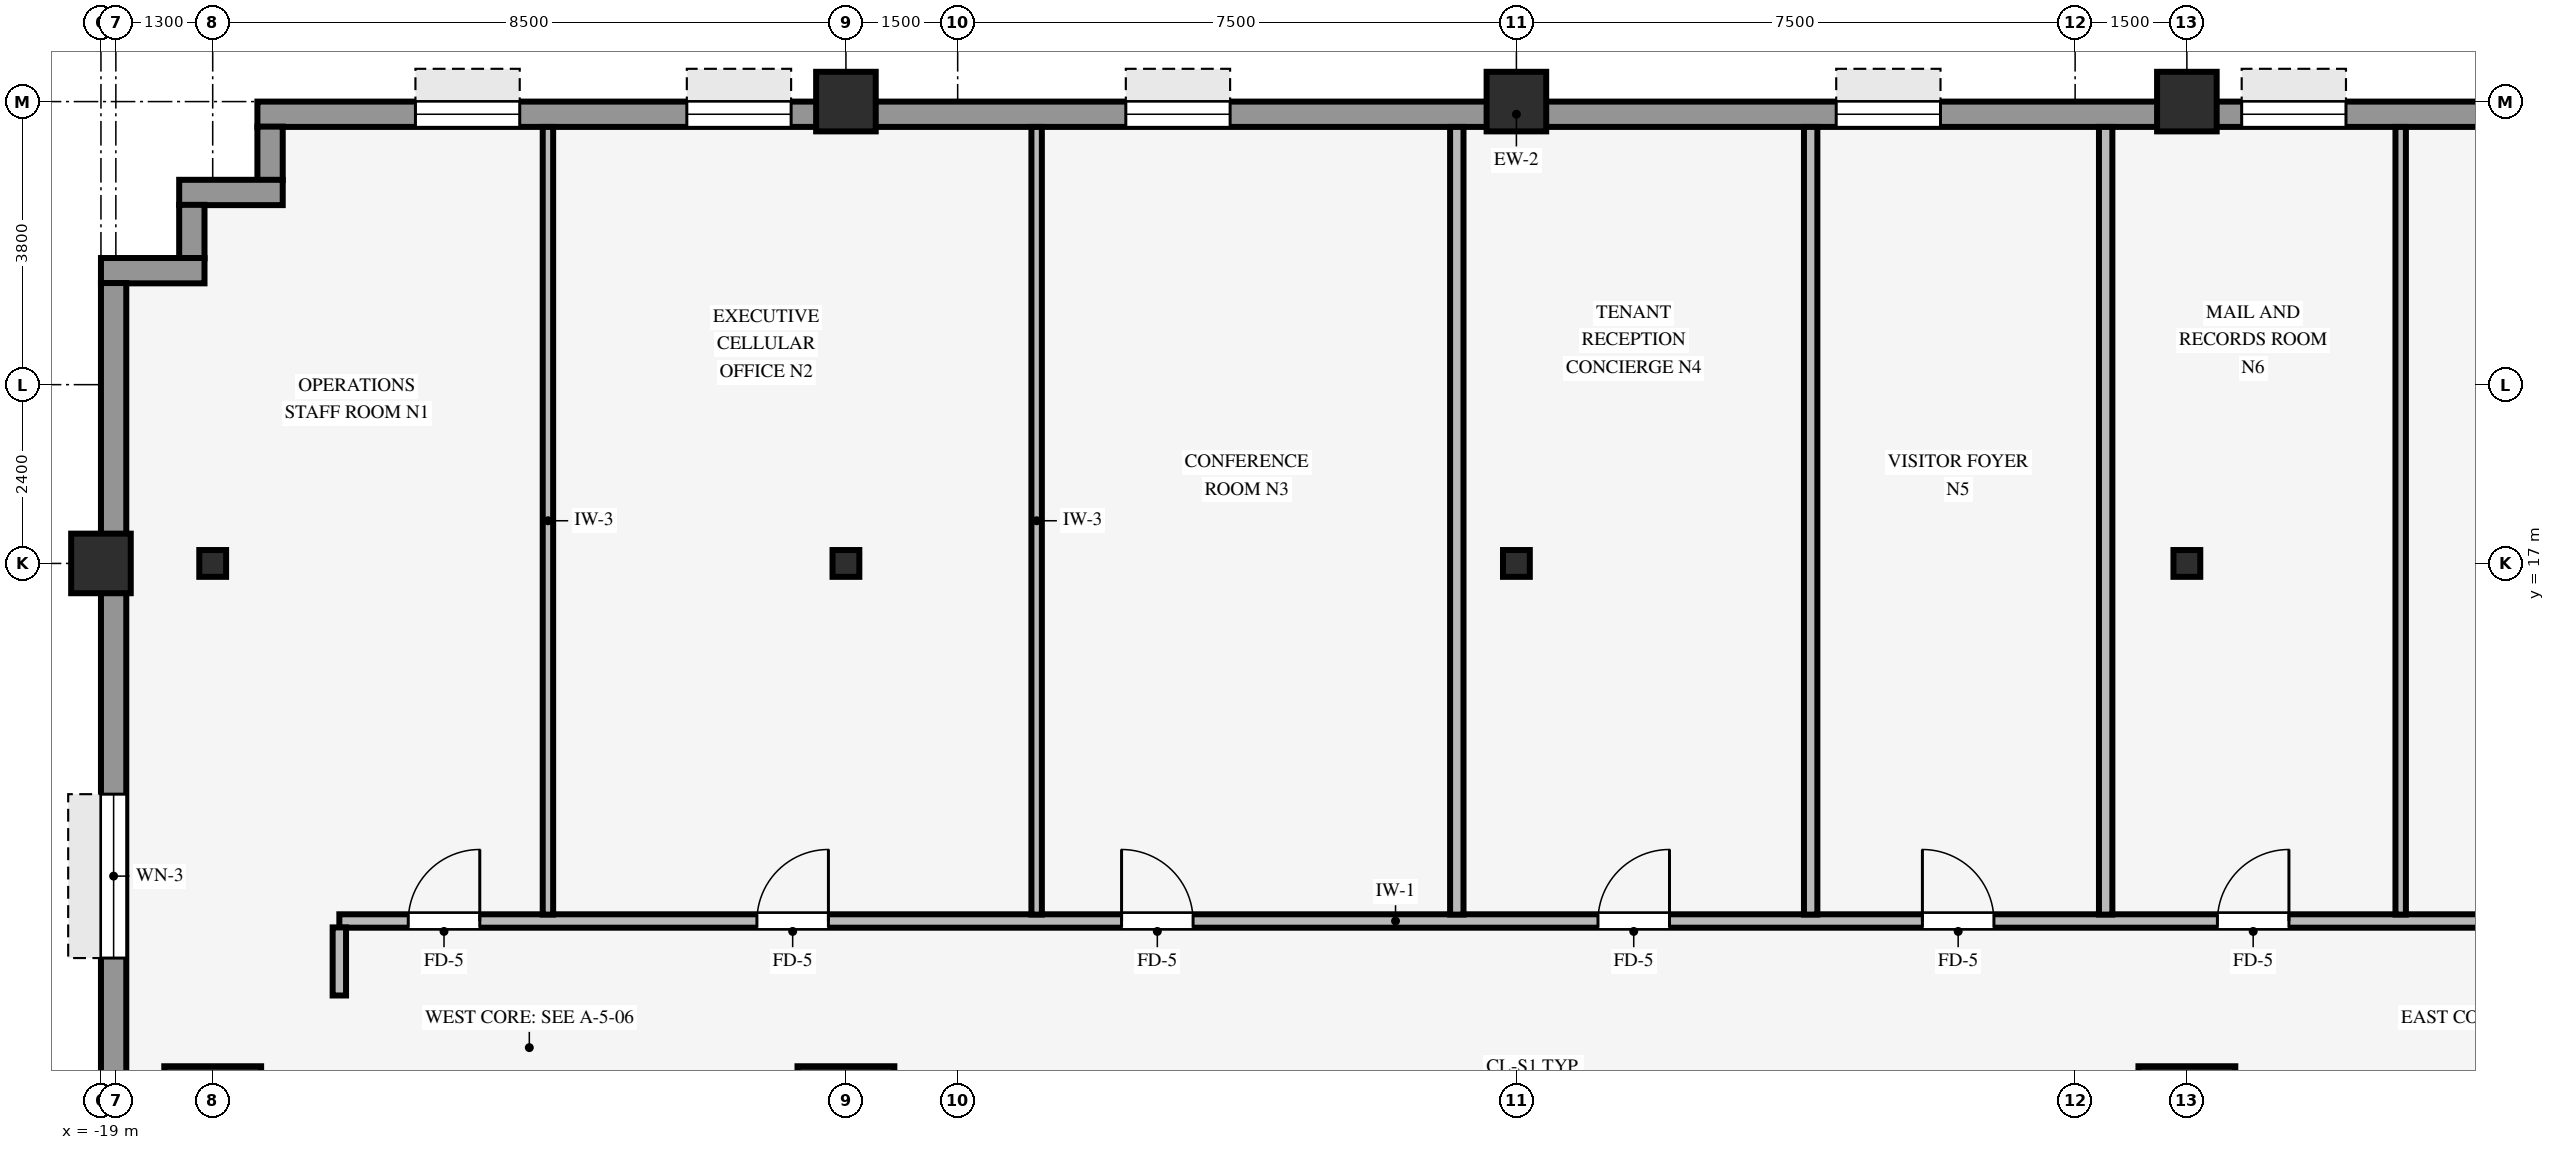
"""IFC4 building model, lengths in metres.
Left out: names, types, materials, properties, quantities, classifications, styles, units other than length and angle.
Written with IfcOpenShell. Run it as: python <this file> out.ifc"""

import sys

from ifc_helpers import new_model, si_unit, direction, frame, frame_2d, origin, origin_2d, place, context, subcontext, project, spatial, rectangle, hollow_rectangle, i_section, extrude, source, transform, mapped, element, fill, save


model = new_model("IFC4")
c1 = context("Model", 3, precision=1e-05, world=origin(), true_north=direction((0.0, 1.0)))
c2 = subcontext(c1, "Body", "Model", "MODEL_VIEW")
j1 = project(units=[si_unit("LENGTHUNIT", "METRE"), si_unit("PLANEANGLEUNIT", "RADIAN")], contexts=[c1])
p1 = place(None, origin())
s1 = spatial("IfcSite", under=j1, at=p1, CompositionType="ELEMENT")
p2 = place(p1, origin())
s2 = spatial("IfcBuilding", under=s1, at=p2, CompositionType="ELEMENT")
p3 = place(p2, frame((0.0, 0.0, 49.5)))
s3 = spatial("IfcBuildingStorey", under=s2, at=p3, CompositionType="ELEMENT", Elevation=49.5)
for number, where, z_axis, x_axis in (
    (1, (-17.5, 9.6, 0.0), (0.0, 0.0, 1.0), (1.0, 0.0, 0.0)),
    (2, (-9.0, 9.6, 0.0), (0.0, 0.0, 1.0), (1.0, 0.0, 0.0)),
    (3, (9.0, 9.6, 0.0), (0.0, 0.0, 1.0), (1.0, 0.0, 0.0)),
):
    element("IfcColumn", number, at=place(p3, frame(where, z_axis=z_axis, x_axis=x_axis)), inside=s3, PredefinedType="COLUMN", context=c2, shape_type="SweptSolid", body=[
        extrude(rectangle(XDim=1.3, YDim=1.3, at=origin_2d()), origin(), (0.0, 0.0, 1.0), 3.37),
    ])
for number, where, z_axis, x_axis in (
    (4, (-19.0, 17.0, 0.0), (0.0, 0.0, 1.0), (1.0, 0.0, 0.0)),
    (5, (-9.0, 23.2, 0.0), (0.0, 0.0, 1.0), (1.0, 0.0, 0.0)),
    (6, (0.0, 23.2, 0.0), (0.0, 0.0, 1.0), (1.0, 0.0, 0.0)),
    (7, (9.0, 23.2, 0.0), (0.0, 0.0, 1.0), (1.0, 0.0, 0.0)),
):
    element("IfcColumn", number, at=place(p3, frame(where, z_axis=z_axis, x_axis=x_axis)), inside=s3, PredefinedType="COLUMN", context=c2, shape_type="SweptSolid", body=[
        extrude(hollow_rectangle(XDim=0.8, YDim=0.8, WallThickness=0.055, InnerFilletRadius=0.055, OuterFilletRadius=0.11, at=origin_2d()), origin(), (0.0, 0.0, 1.0), 3.37),
    ])
for number, where, z_axis, x_axis in (
    (8, (0.0, 17.0, 0.0), (0.0, 0.0, 1.0), (1.0, 0.0, 0.0)),
    (9, (-17.5, 17.0, 0.0), (0.0, 0.0, 1.0), (1.0, 0.0, 0.0)),
    (10, (-9.0, 17.0, 0.0), (0.0, 0.0, 1.0), (1.0, 0.0, 0.0)),
    (11, (9.0, 17.0, 0.0), (0.0, 0.0, 1.0), (1.0, 0.0, 0.0)),
):
    element("IfcColumn", number, at=place(p3, frame(where, z_axis=z_axis, x_axis=x_axis)), inside=s3, PredefinedType="COLUMN", context=c2, shape_type="SweptSolid", body=[
        extrude(i_section(OverallWidth=0.36, OverallDepth=0.36, WebThickness=0.021, FlangeThickness=0.021, FilletRadius=0.018, at=origin_2d()), origin(), (0.0, 0.0, 1.0), 3.37),
    ])
p4 = place(p3, frame((-16.9, 23.03, 0.0), z_axis=(0.0, 0.0, 1.0), x_axis=(1.0, 0.0, 0.0)))
e12 = element("IfcWall", 12, at=p4, inside=s3, PredefinedType="STANDARD", context=c2, shape_type="SweptSolid", body=[
    extrude(rectangle(XDim=33.8, YDim=0.34, at=frame_2d((16.9, 0.0))), origin(), (0.0, 0.0, 1.0), 2.705),
])
p5 = place(p4, frame((2.121, 0.0, 0.8)))
e13 = element("IfcOpeningElement", 13, at=p5, cuts=e12, PredefinedType="OPENING", context=c2, shape_type="SweptSolid", body=[
    extrude(rectangle(XDim=1.4, YDim=1.65, at=frame_2d((0.7, 0.825))), frame((0.0, 0.18, 0.0), z_axis=(0.0, -1.0, 0.0), x_axis=(1.0, 0.0, 0.0)), (0.0, 0.0, 1.0), 0.36),
])
p6 = place(p4, frame((5.764, 0.0, 0.8)))
e14 = element("IfcOpeningElement", 14, at=p6, cuts=e12, PredefinedType="OPENING", context=c2, shape_type="SweptSolid", body=[
    extrude(rectangle(XDim=1.4, YDim=1.65, at=frame_2d((0.7, 0.825))), frame((0.0, 0.18, 0.0), z_axis=(0.0, -1.0, 0.0), x_axis=(1.0, 0.0, 0.0)), (0.0, 0.0, 1.0), 0.36),
])
p7 = place(p4, frame((11.657, 0.0, 0.8)))
e15 = element("IfcOpeningElement", 15, at=p7, cuts=e12, PredefinedType="OPENING", context=c2, shape_type="SweptSolid", body=[
    extrude(rectangle(XDim=1.4, YDim=1.65, at=frame_2d((0.7, 0.825))), frame((0.0, 0.18, 0.0), z_axis=(0.0, -1.0, 0.0), x_axis=(1.0, 0.0, 0.0)), (0.0, 0.0, 1.0), 0.36),
])
p8 = place(p4, frame((21.193, 0.0, 0.8)))
e16 = element("IfcOpeningElement", 16, at=p8, cuts=e12, PredefinedType="OPENING", context=c2, shape_type="SweptSolid", body=[
    extrude(rectangle(XDim=1.4, YDim=1.65, at=frame_2d((0.7, 0.825))), frame((0.0, 0.18, 0.0), z_axis=(0.0, -1.0, 0.0), x_axis=(1.0, 0.0, 0.0)), (0.0, 0.0, 1.0), 0.36),
])
p9 = place(p4, frame((26.636, 0.0, 0.8)))
e17 = element("IfcOpeningElement", 17, at=p9, cuts=e12, PredefinedType="OPENING", context=c2, shape_type="SweptSolid", body=[
    extrude(rectangle(XDim=1.4, YDim=1.65, at=frame_2d((0.7, 0.825))), frame((0.0, 0.18, 0.0), z_axis=(0.0, -1.0, 0.0), x_axis=(1.0, 0.0, 0.0)), (0.0, 0.0, 1.0), 0.36),
])
p10 = place(p4, frame((29.829, 0.0, 0.8)))
e18 = element("IfcOpeningElement", 18, at=p10, cuts=e12, PredefinedType="OPENING", context=c2, shape_type="SweptSolid", body=[
    extrude(rectangle(XDim=1.4, YDim=1.65, at=frame_2d((0.7, 0.825))), frame((0.0, 0.18, 0.0), z_axis=(0.0, -1.0, 0.0), x_axis=(1.0, 0.0, 0.0)), (0.0, 0.0, 1.0), 0.36),
])
p11 = place(p3, frame((-16.73, 22.146, 0.0), z_axis=(0.0, 0.0, 1.0), x_axis=(0.0, 1.0, 0.0)))
e19 = element("IfcWall", 19, at=p11, inside=s3, PredefinedType="STANDARD", context=c2, shape_type="SweptSolid", body=[
    extrude(rectangle(XDim=0.718, YDim=0.34, at=frame_2d((0.359, 0.0))), origin(), (0.0, 0.0, 1.0), 3.36),
])
p12 = place(p3, frame((-17.95, 21.98, 0.0), z_axis=(0.0, 0.0, 1.0), x_axis=(1.0, 0.0, 0.0)))
e20 = element("IfcWall", 20, at=p12, inside=s3, PredefinedType="STANDARD", context=c2, shape_type="SweptSolid", body=[
    extrude(rectangle(XDim=1.39, YDim=0.34, at=frame_2d((0.695, 0.0))), origin(), (0.0, 0.0, 1.0), 3.36),
])
p13 = place(p3, frame((-17.78, 21.096, 0.0), z_axis=(0.0, 0.0, 1.0), x_axis=(0.0, 1.0, 0.0)))
e21 = element("IfcWall", 21, at=p13, inside=s3, PredefinedType="STANDARD", context=c2, shape_type="SweptSolid", body=[
    extrude(rectangle(XDim=0.718, YDim=0.34, at=frame_2d((0.359, 0.0))), origin(), (0.0, 0.0, 1.0), 3.36),
])
p14 = place(p3, frame((-19.0, 20.93, 0.0), z_axis=(0.0, 0.0, 1.0), x_axis=(1.0, 0.0, 0.0)))
e22 = element("IfcWall", 22, at=p14, inside=s3, PredefinedType="STANDARD", context=c2, shape_type="SweptSolid", body=[
    extrude(rectangle(XDim=1.39, YDim=0.34, at=frame_2d((0.695, 0.0))), origin(), (0.0, 0.0, 1.0), 3.36),
])
p15 = place(p3, frame((-18.83, -20.764, 0.0), z_axis=(0.0, 0.0, 1.0), x_axis=(0.0, 1.0, 0.0)))
e23 = element("IfcWall", 23, at=p15, inside=s3, PredefinedType="STANDARD", context=c2, shape_type="SweptSolid", body=[
    extrude(rectangle(XDim=41.528, YDim=0.34, at=frame_2d((20.764, 0.0))), origin(), (0.0, 0.0, 1.0), 2.705),
])
p16 = place(p15, frame((6.864, 0.0, 0.0)))
e24 = element("IfcOpeningElement", 24, at=p16, cuts=e23, PredefinedType="OPENING", context=c2, shape_type="SweptSolid", body=[
    extrude(rectangle(XDim=1.05, YDim=2.1, at=frame_2d((0.525, 1.05))), frame((0.0, 0.18, 0.0), z_axis=(0.0, -1.0, 0.0), x_axis=(1.0, 0.0, 0.0)), (0.0, 0.0, 1.0), 0.36),
])
p17 = place(p15, frame((32.467, 0.0, 0.8)))
e25 = element("IfcOpeningElement", 25, at=p17, cuts=e23, PredefinedType="OPENING", context=c2, shape_type="SweptSolid", body=[
    extrude(rectangle(XDim=2.2, YDim=1.65, at=frame_2d((1.1, 0.825))), frame((0.0, 0.18, 0.0), z_axis=(0.0, -1.0, 0.0), x_axis=(1.0, 0.0, 0.0)), (0.0, 0.0, 1.0), 0.36),
])
p18 = place(p3, frame((-15.8, 12.2, 0.0), z_axis=(0.0, 0.0, 1.0), x_axis=(1.0, 0.0, 0.0)))
e26 = element("IfcWall", 26, at=p18, inside=s3, PredefinedType="PARTITIONING", context=c2, shape_type="SweptSolid", body=[
    extrude(rectangle(XDim=31.6, YDim=0.18, at=frame_2d((15.8, 0.0))), origin(), (0.0, 0.0, 1.0), 3.36),
])
p19 = place(p18, frame((5.605, 0.0, 0.0)))
e27 = element("IfcOpeningElement", 27, at=p19, cuts=e26, PredefinedType="OPENING", context=c2, shape_type="SweptSolid", body=[
    extrude(rectangle(XDim=0.96, YDim=2.1, at=frame_2d((0.48, 1.05))), frame((0.0, 0.1, 0.0), z_axis=(0.0, -1.0, 0.0), x_axis=(1.0, 0.0, 0.0)), (0.0, 0.0, 1.0), 0.2),
])
p20 = place(p18, frame((16.895, 0.0, 0.0)))
e28 = element("IfcOpeningElement", 28, at=p20, cuts=e26, PredefinedType="OPENING", context=c2, shape_type="SweptSolid", body=[
    extrude(rectangle(XDim=0.96, YDim=2.1, at=frame_2d((0.48, 1.05))), frame((0.0, 0.1, 0.0), z_axis=(0.0, -1.0, 0.0), x_axis=(1.0, 0.0, 0.0)), (0.0, 0.0, 1.0), 0.2),
])
p21 = place(p18, frame((21.25, 0.0, 0.0)))
e29 = element("IfcOpeningElement", 29, at=p21, cuts=e26, PredefinedType="OPENING", context=c2, shape_type="SweptSolid", body=[
    extrude(rectangle(XDim=0.96, YDim=2.1, at=frame_2d((0.48, 1.05))), frame((0.0, 0.1, 0.0), z_axis=(0.0, -1.0, 0.0), x_axis=(1.0, 0.0, 0.0)), (0.0, 0.0, 1.0), 0.2),
])
p22 = place(p18, frame((25.21, 0.0, 0.0)))
e30 = element("IfcOpeningElement", 30, at=p22, cuts=e26, PredefinedType="OPENING", context=c2, shape_type="SweptSolid", body=[
    extrude(rectangle(XDim=0.96, YDim=2.1, at=frame_2d((0.48, 1.05))), frame((0.0, 0.1, 0.0), z_axis=(0.0, -1.0, 0.0), x_axis=(1.0, 0.0, 0.0)), (0.0, 0.0, 1.0), 0.2),
])
p23 = place(p18, frame((29.155, 0.0, 0.0)))
e31 = element("IfcOpeningElement", 31, at=p23, cuts=e26, PredefinedType="OPENING", context=c2, shape_type="SweptSolid", body=[
    extrude(rectangle(XDim=0.96, YDim=2.1, at=frame_2d((0.48, 1.05))), frame((0.0, 0.1, 0.0), z_axis=(0.0, -1.0, 0.0), x_axis=(1.0, 0.0, 0.0)), (0.0, 0.0, 1.0), 0.2),
])
p24 = place(p18, frame((10.5, 0.0, 0.0)))
e32 = element("IfcOpeningElement", 32, at=p24, cuts=e26, PredefinedType="OPENING", context=c2, shape_type="SweptSolid", body=[
    extrude(rectangle(XDim=0.96, YDim=2.1, at=frame_2d((0.48, 1.05))), frame((0.0, 0.1, 0.0), z_axis=(0.0, -1.0, 0.0), x_axis=(1.0, 0.0, 0.0)), (0.0, 0.0, 1.0), 0.2),
])
p25 = place(p18, frame((0.925, 0.0, 0.0)))
e33 = element("IfcOpeningElement", 33, at=p25, cuts=e26, PredefinedType="OPENING", context=c2, shape_type="SweptSolid", body=[
    extrude(rectangle(XDim=0.96, YDim=2.1, at=frame_2d((0.48, 1.05))), frame((0.0, 0.1, 0.0), z_axis=(0.0, -1.0, 0.0), x_axis=(1.0, 0.0, 0.0)), (0.0, 0.0, 1.0), 0.2),
])
p26 = place(p3, frame((-15.8, 11.2, 0.0), z_axis=(0.0, 0.0, 1.0), x_axis=(0.0, 1.0, 0.0)))
e34 = element("IfcWall", 34, at=p26, inside=s3, PredefinedType="PARTITIONING", context=c2, shape_type="SweptSolid", body=[
    extrude(rectangle(XDim=0.914, YDim=0.18, at=frame_2d((0.457, 0.0))), origin(), (0.0, 0.0, 1.0), 3.36),
])
for number, where, z_axis, x_axis in (
    (35, (-13.0, 12.286, 0.0), (0.0, 0.0, 1.0), (0.0, 1.0, 0.0)),
    (36, (-6.44, 12.286, 0.0), (0.0, 0.0, 1.0), (0.0, 1.0, 0.0)),
):
    element("IfcWall", number, at=place(p3, frame(where, z_axis=z_axis, x_axis=x_axis)), inside=s3, PredefinedType="PARTITIONING", context=c2, shape_type="SweptSolid", body=[
        extrude(rectangle(XDim=10.574, YDim=0.14, at=frame_2d((5.287, 0.0))), origin(), (0.0, 0.0, 1.0), 3.36),
    ])
for number, where, z_axis, x_axis in (
    (37, (-0.8, 12.286, 0.0), (0.0, 0.0, 1.0), (0.0, 1.0, 0.0)),
    (38, (3.95, 12.286, 0.0), (0.0, 0.0, 1.0), (0.0, 1.0, 0.0)),
    (39, (7.91, 12.286, 0.0), (0.0, 0.0, 1.0), (0.0, 1.0, 0.0)),
):
    element("IfcWall", number, at=place(p3, frame(where, z_axis=z_axis, x_axis=x_axis)), inside=s3, PredefinedType="PARTITIONING", context=c2, shape_type="SweptSolid", body=[
        extrude(rectangle(XDim=10.574, YDim=0.18, at=frame_2d((5.287, 0.0))), origin(), (0.0, 0.0, 1.0), 3.36),
    ])
p27 = place(p3, frame((11.87, 12.286, 0.0), z_axis=(0.0, 0.0, 1.0), x_axis=(0.0, 1.0, 0.0)))
e40 = element("IfcWall", 40, at=p27, inside=s3, PredefinedType="PARTITIONING", context=c2, shape_type="SweptSolid", body=[
    extrude(rectangle(XDim=10.574, YDim=0.14, at=frame_2d((5.287, 0.0))), origin(), (0.0, 0.0, 1.0), 3.36),
])
m1 = source(origin(), c2, "Body", "SweptSolid", [
    extrude(rectangle(XDim=1.4, YDim=1.65, at=frame_2d((0.7, 0.825))), frame((0.0, 0.03, 0.0), z_axis=(0.0, -1.0, 0.0), x_axis=(1.0, 0.0, 0.0)), (0.0, 0.0, 1.0), 0.06),
])
p28 = place(p5, origin())
e41 = element("IfcWindow", 41, at=p28, inside=s3, PartitioningType="SINGLE_PANEL", PredefinedType="WINDOW", context=c2, shape_type="MappedRepresentation", body=[
    mapped(m1, transform((0.0, 0.0, 0.0), scale=1.0)),
])
fill(e13, e41)
p29 = place(p6, origin())
e42 = element("IfcWindow", 42, at=p29, inside=s3, PartitioningType="SINGLE_PANEL", PredefinedType="WINDOW", context=c2, shape_type="MappedRepresentation", body=[
    mapped(m1, transform((0.0, 0.0, 0.0), scale=1.0)),
])
fill(e14, e42)
p30 = place(p7, origin())
e43 = element("IfcWindow", 43, at=p30, inside=s3, PartitioningType="SINGLE_PANEL", PredefinedType="WINDOW", context=c2, shape_type="MappedRepresentation", body=[
    mapped(m1, transform((0.0, 0.0, 0.0), scale=1.0)),
])
fill(e15, e43)
p31 = place(p8, origin())
e44 = element("IfcWindow", 44, at=p31, inside=s3, PartitioningType="SINGLE_PANEL", PredefinedType="WINDOW", context=c2, shape_type="MappedRepresentation", body=[
    mapped(m1, transform((0.0, 0.0, 0.0), scale=1.0)),
])
fill(e16, e44)
p32 = place(p9, origin())
e45 = element("IfcWindow", 45, at=p32, inside=s3, PartitioningType="SINGLE_PANEL", PredefinedType="WINDOW", context=c2, shape_type="MappedRepresentation", body=[
    mapped(m1, transform((0.0, 0.0, 0.0), scale=1.0)),
])
fill(e17, e45)
m2 = source(origin(), c2, "Body", "SweptSolid", [
    extrude(rectangle(XDim=2.2, YDim=1.65, at=frame_2d((1.1, 0.825))), frame((0.0, 0.03, 0.0), z_axis=(0.0, -1.0, 0.0), x_axis=(1.0, 0.0, 0.0)), (0.0, 0.0, 1.0), 0.06),
])
p33 = place(p17, origin())
e46 = element("IfcWindow", 46, at=p33, inside=s3, PartitioningType="SINGLE_PANEL", PredefinedType="WINDOW", context=c2, shape_type="MappedRepresentation", body=[
    mapped(m2, transform((0.0, 0.0, 0.0), scale=1.0)),
])
fill(e25, e46)
m3 = source(origin(), c2, "Body", "SweptSolid", [
    extrude(rectangle(XDim=0.96, YDim=2.1, at=frame_2d((0.48, 1.05))), frame((0.0, 0.025, 0.0), z_axis=(0.0, -1.0, 0.0), x_axis=(1.0, 0.0, 0.0)), (0.0, 0.0, 1.0), 0.05),
])
p34 = place(p19, origin())
e47 = element("IfcDoor", 47, at=p34, inside=s3, OperationType="SINGLE_SWING_RIGHT", PredefinedType="DOOR", context=c2, shape_type="MappedRepresentation", body=[
    mapped(m3, transform((0.0, 0.0, 0.0), scale=1.0)),
])
fill(e27, e47)
p35 = place(p20, origin())
e48 = element("IfcDoor", 48, at=p35, inside=s3, OperationType="SINGLE_SWING_RIGHT", PredefinedType="DOOR", context=c2, shape_type="MappedRepresentation", body=[
    mapped(m3, transform((0.0, 0.0, 0.0), scale=1.0)),
])
fill(e28, e48)
p36 = place(p21, origin())
e49 = element("IfcDoor", 49, at=p36, inside=s3, OperationType="SINGLE_SWING_LEFT", PredefinedType="DOOR", context=c2, shape_type="MappedRepresentation", body=[
    mapped(m3, transform((0.0, 0.0, 0.0), scale=1.0)),
])
fill(e29, e49)
p37 = place(p22, origin())
e50 = element("IfcDoor", 50, at=p37, inside=s3, OperationType="SINGLE_SWING_RIGHT", PredefinedType="DOOR", context=c2, shape_type="MappedRepresentation", body=[
    mapped(m3, transform((0.0, 0.0, 0.0), scale=1.0)),
])
fill(e30, e50)
p38 = place(p24, origin())
e51 = element("IfcDoor", 51, at=p38, inside=s3, OperationType="SINGLE_SWING_LEFT", PredefinedType="DOOR", context=c2, shape_type="MappedRepresentation", body=[
    mapped(m3, transform((0.0, 0.0, 0.0), scale=1.0)),
])
fill(e32, e51)
p39 = place(p25, origin())
e52 = element("IfcDoor", 52, at=p39, inside=s3, OperationType="SINGLE_SWING_RIGHT", PredefinedType="DOOR", context=c2, shape_type="MappedRepresentation", body=[
    mapped(m3, transform((0.0, 0.0, 0.0), scale=1.0)),
])
fill(e33, e52)
save(model, sys.argv[1])
